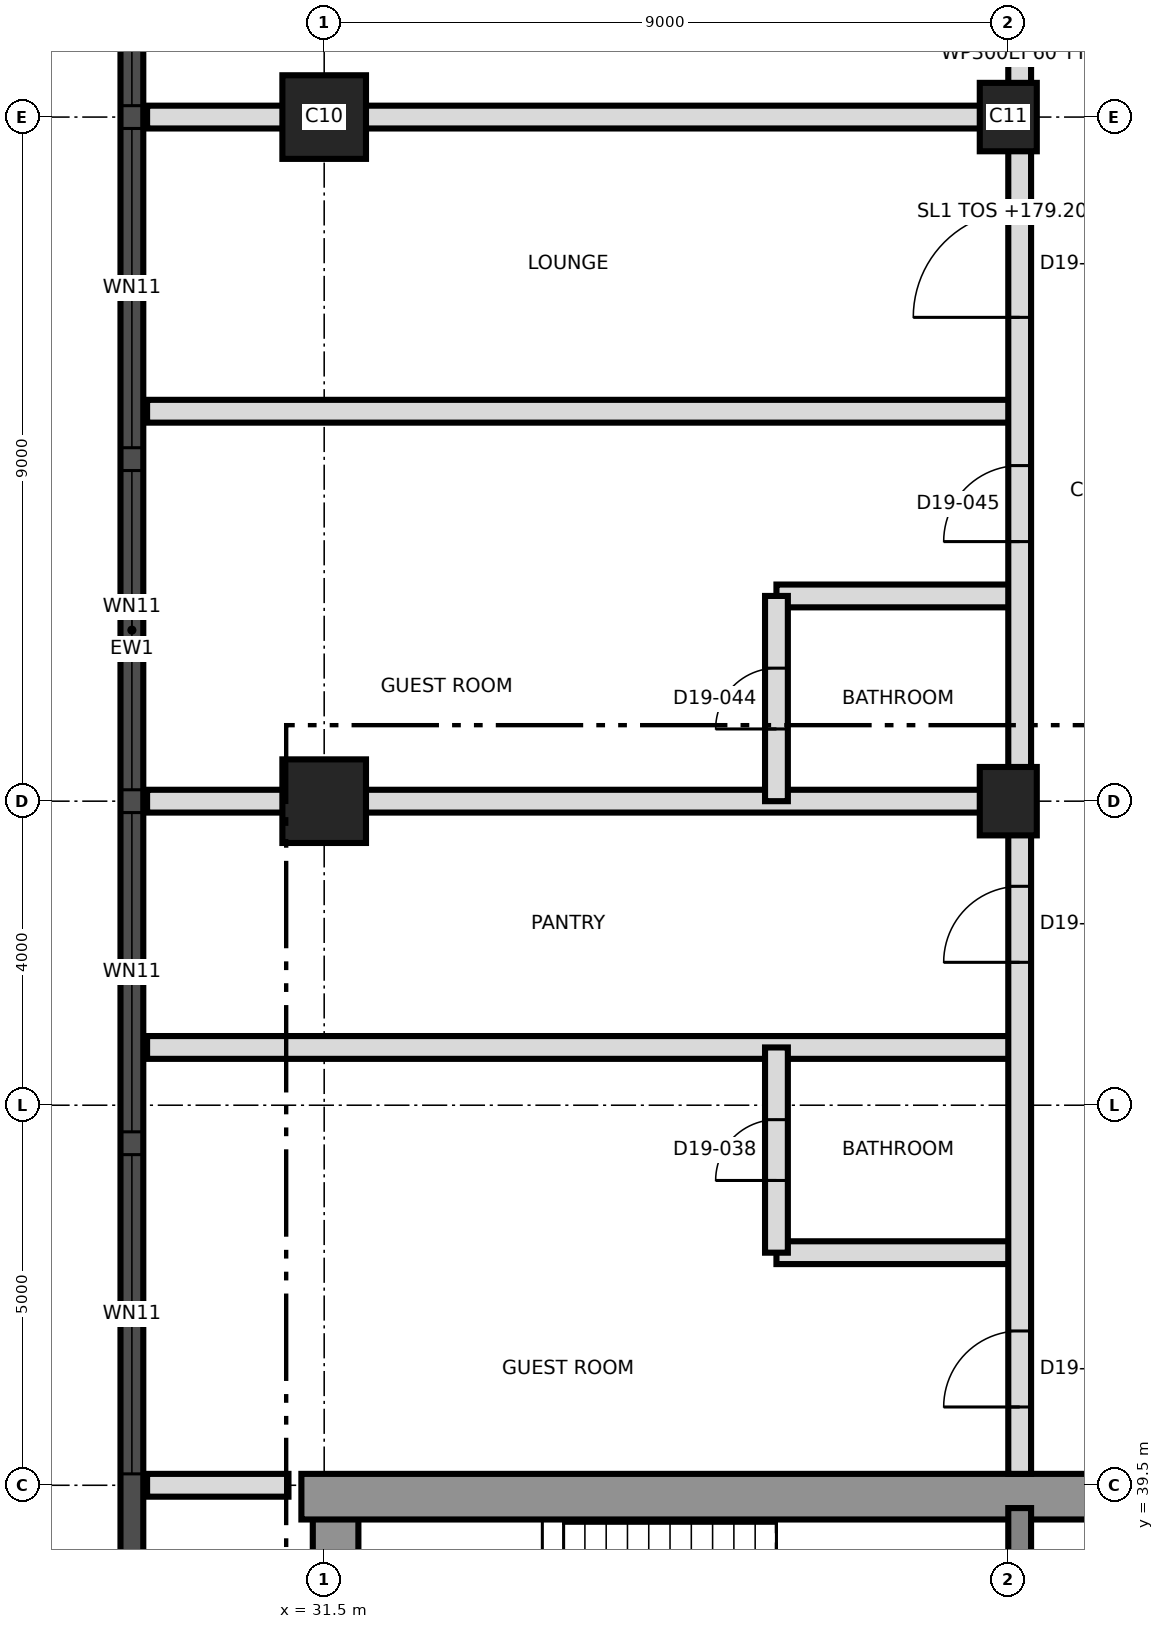
"""IFC4 building model, lengths in metres.
Left out: names, types, materials, properties, quantities, classifications, styles, units other than length and angle.
Written with IfcOpenShell. Run it as: python <this file> out.ifc"""

import sys

from ifc_helpers import new_model, si_unit, direction, frame, frame_2d, origin, origin_2d, place, context, subcontext, project, spatial, rectangle, extrude, element, fill, save


model = new_model("IFC4")
c1 = context("Model", 3, precision=1e-05, world=origin(), true_north=direction((0.0, 1.0)))
c2 = subcontext(c1, "Body", "Model", "MODEL_VIEW")
j1 = project(units=[si_unit("LENGTHUNIT", "METRE"), si_unit("PLANEANGLEUNIT", "RADIAN")], contexts=[c1])
p1 = place(None, origin())
s1 = spatial("IfcSite", under=j1, at=p1, CompositionType="ELEMENT")
p2 = place(p1, origin())
s2 = spatial("IfcBuilding", under=s1, at=p2, CompositionType="ELEMENT")
p3 = place(p2, frame((0.0, 0.0, 179.2)))
s3 = spatial("IfcBuildingStorey", under=s2, at=p3, CompositionType="ELEMENT", Elevation=179.2)
p4 = place(p3, frame((31.65, 21.8, 0.0), z_axis=(0.0, 0.0, 1.0), x_axis=(0.0, 1.0, 0.0)))
e1 = element("IfcWall", 1, at=p4, inside=s3, PredefinedType="SHEAR", context=c2, shape_type="SweptSolid", body=[
    extrude(rectangle(XDim=17.4, YDim=0.6, at=frame_2d((8.7, 0.0))), origin(), (0.0, 0.0, 1.0), 3.7),
])
p5 = place(p3, frame((31.2, 39.35, 0.0), z_axis=(0.0, 0.0, 1.0), x_axis=(1.0, 0.0, 0.0)))
e2 = element("IfcWall", 2, at=p5, inside=s3, PredefinedType="SHEAR", context=c2, shape_type="SweptSolid", body=[
    extrude(rectangle(XDim=27.0, YDim=0.6, at=frame_2d((13.5, 0.0))), origin(), (0.0, 0.0, 1.0), 3.7),
])
p6 = place(p5, frame((10.5, 0.0, 0.0)))
e3 = element("IfcOpeningElement", 3, at=p6, cuts=e2, PredefinedType="OPENING", context=c2, shape_type="SweptSolid", body=[
    extrude(rectangle(XDim=1.2, YDim=2.1, at=frame_2d((0.6, 1.05))), frame((0.0, 0.31, 0.0), z_axis=(0.0, -1.0, 0.0), x_axis=(1.0, 0.0, 0.0)), (0.0, 0.0, 1.0), 0.62),
])
p7 = place(p3, frame((40.65, 33.5, 0.0), z_axis=(0.0, 0.0, 1.0), x_axis=(0.0, 1.0, 0.0)))
e4 = element("IfcWall", 4, at=p7, inside=s3, PredefinedType="SHEAR", context=c2, shape_type="SweptSolid", body=[
    extrude(rectangle(XDim=5.7, YDim=0.3, at=frame_2d((2.85, 0.0))), origin(), (0.0, 0.0, 1.0), 3.7),
])
p8 = place(p3, frame((31.5, 48.5, 0.0), z_axis=(0.0, 0.0, 1.0), x_axis=(1.0, 0.0, 0.0)))
e5 = element("IfcColumn", 5, at=p8, inside=s3, PredefinedType="COLUMN", context=c2, shape_type="SweptSolid", body=[
    extrude(rectangle(XDim=1.1, YDim=1.1, at=origin_2d()), origin(), (0.0, 0.0, 1.0), 3.7),
])
p9 = place(p3, frame((40.5, 48.5, 0.0), z_axis=(0.0, 0.0, 1.0), x_axis=(0.0, 1.0, 0.0)))
e6 = element("IfcColumn", 6, at=p9, inside=s3, PredefinedType="COLUMN", context=c2, shape_type="SweptSolid", body=[
    extrude(rectangle(XDim=0.9, YDim=0.75, at=origin_2d()), origin(), (0.0, 0.0, 1.0), 3.7),
])
p10 = place(p3, frame((31.5, 57.5, 0.0), z_axis=(0.0, 0.0, 1.0), x_axis=(1.0, 0.0, 0.0)))
e7 = element("IfcColumn", 7, at=p10, inside=s3, PredefinedType="COLUMN", context=c2, shape_type="SweptSolid", body=[
    extrude(rectangle(XDim=1.1, YDim=1.1, at=origin_2d()), origin(), (0.0, 0.0, 1.0), 3.7),
])
p11 = place(p3, frame((40.5, 57.5, 0.0), z_axis=(0.0, 0.0, 1.0), x_axis=(0.0, 1.0, 0.0)))
e8 = element("IfcColumn", 8, at=p11, inside=s3, PredefinedType="COLUMN", context=c2, shape_type="SweptSolid", body=[
    extrude(rectangle(XDim=0.9, YDim=0.75, at=origin_2d()), origin(), (0.0, 0.0, 1.0), 3.7),
])
p12 = place(p3, frame((28.97, 66.986, 0.0), z_axis=(0.0, 0.0, 1.0), x_axis=(0.0, -1.0, 0.0)))
e9 = element("IfcWall", 9, at=p12, inside=s3, PredefinedType="SOLIDWALL", context=c2, shape_type="SweptSolid", body=[
    extrude(rectangle(XDim=32.976, YDim=0.3, at=frame_2d((16.488, 0.0))), origin(), (0.0, 0.0, 1.0), 3.4),
])
p13 = place(p12, frame((1.593, 0.0, 0.3)))
e10 = element("IfcOpeningElement", 10, at=p13, cuts=e9, PredefinedType="OPENING", context=c2, shape_type="SweptSolid", body=[
    extrude(rectangle(XDim=1.8, YDim=2.4, at=frame_2d((0.9, 1.2))), frame((0.0, 0.16, 0.0), z_axis=(0.0, -1.0, 0.0), x_axis=(1.0, 0.0, 0.0)), (0.0, 0.0, 1.0), 0.32),
])
p14 = place(p12, frame((5.136, 0.0, 0.9)))
e11 = element("IfcOpeningElement", 11, at=p14, cuts=e9, PredefinedType="OPENING", context=c2, shape_type="SweptSolid", body=[
    extrude(rectangle(XDim=4.2, YDim=1.5, at=frame_2d((2.1, 0.75))), frame((0.0, 0.16, 0.0), z_axis=(0.0, -1.0, 0.0), x_axis=(1.0, 0.0, 0.0)), (0.0, 0.0, 1.0), 0.32),
])
p15 = place(p12, frame((9.636, 0.0, 0.9)))
e12 = element("IfcOpeningElement", 12, at=p15, cuts=e9, PredefinedType="OPENING", context=c2, shape_type="SweptSolid", body=[
    extrude(rectangle(XDim=4.2, YDim=1.5, at=frame_2d((2.1, 0.75))), frame((0.0, 0.16, 0.0), z_axis=(0.0, -1.0, 0.0), x_axis=(1.0, 0.0, 0.0)), (0.0, 0.0, 1.0), 0.32),
])
p16 = place(p12, frame((14.136, 0.0, 0.9)))
e13 = element("IfcOpeningElement", 13, at=p16, cuts=e9, PredefinedType="OPENING", context=c2, shape_type="SweptSolid", body=[
    extrude(rectangle(XDim=4.2, YDim=1.5, at=frame_2d((2.1, 0.75))), frame((0.0, 0.16, 0.0), z_axis=(0.0, -1.0, 0.0), x_axis=(1.0, 0.0, 0.0)), (0.0, 0.0, 1.0), 0.32),
])
p17 = place(p12, frame((18.636, 0.0, 0.9)))
e14 = element("IfcOpeningElement", 14, at=p17, cuts=e9, PredefinedType="OPENING", context=c2, shape_type="SweptSolid", body=[
    extrude(rectangle(XDim=4.2, YDim=1.5, at=frame_2d((2.1, 0.75))), frame((0.0, 0.16, 0.0), z_axis=(0.0, -1.0, 0.0), x_axis=(1.0, 0.0, 0.0)), (0.0, 0.0, 1.0), 0.32),
])
p18 = place(p12, frame((23.136, 0.0, 0.9)))
e15 = element("IfcOpeningElement", 15, at=p18, cuts=e9, PredefinedType="OPENING", context=c2, shape_type="SweptSolid", body=[
    extrude(rectangle(XDim=4.2, YDim=1.5, at=frame_2d((2.1, 0.75))), frame((0.0, 0.16, 0.0), z_axis=(0.0, -1.0, 0.0), x_axis=(1.0, 0.0, 0.0)), (0.0, 0.0, 1.0), 0.32),
])
p19 = place(p12, frame((29.331, 0.0, 0.3)))
e16 = element("IfcOpeningElement", 16, at=p19, cuts=e9, PredefinedType="OPENING", context=c2, shape_type="SweptSolid", body=[
    extrude(rectangle(XDim=1.8, YDim=2.4, at=frame_2d((0.9, 1.2))), frame((0.0, 0.16, 0.0), z_axis=(0.0, -1.0, 0.0), x_axis=(1.0, 0.0, 0.0)), (0.0, 0.0, 1.0), 0.32),
])
p20 = place(p3, frame((29.17, 39.5, 0.0), z_axis=(0.0, 0.0, 1.0), x_axis=(1.0, 0.0, 0.0)))
e17 = element("IfcWall", 17, at=p20, inside=s3, PredefinedType="PARTITIONING", context=c2, shape_type="SweptSolid", body=[
    extrude(rectangle(XDim=1.86, YDim=0.3, at=frame_2d((0.93, 0.0))), origin(), (0.0, 0.0, 1.0), 3.4),
])
p21 = place(p3, frame((37.45, 42.56, 0.0), z_axis=(0.0, 0.0, 1.0), x_axis=(1.0, 0.0, 0.0)))
e18 = element("IfcWall", 18, at=p21, inside=s3, PredefinedType="PARTITIONING", context=c2, shape_type="SweptSolid", body=[
    extrude(rectangle(XDim=3.2, YDim=0.3, at=frame_2d((1.6, 0.0))), origin(), (0.0, 0.0, 1.0), 3.4),
])
for number, where, z_axis, x_axis in (
    (19, (29.17, 45.26, 0.0), (0.0, 0.0, 1.0), (1.0, 0.0, 0.0)),
    (20, (29.17, 48.5, 0.0), (0.0, 0.0, 1.0), (1.0, 0.0, 0.0)),
):
    element("IfcWall", number, at=place(p3, frame(where, z_axis=z_axis, x_axis=x_axis)), inside=s3, PredefinedType="PARTITIONING", context=c2, shape_type="SweptSolid", body=[
        extrude(rectangle(XDim=11.48, YDim=0.3, at=frame_2d((5.74, 0.0))), origin(), (0.0, 0.0, 1.0), 3.4),
    ])
p22 = place(p3, frame((37.45, 51.2, 0.0), z_axis=(0.0, 0.0, 1.0), x_axis=(1.0, 0.0, 0.0)))
e21 = element("IfcWall", 21, at=p22, inside=s3, PredefinedType="PARTITIONING", context=c2, shape_type="SweptSolid", body=[
    extrude(rectangle(XDim=3.2, YDim=0.3, at=frame_2d((1.6, 0.0))), origin(), (0.0, 0.0, 1.0), 3.4),
])
for number, where, z_axis, x_axis in (
    (22, (29.17, 53.63, 0.0), (0.0, 0.0, 1.0), (1.0, 0.0, 0.0)),
    (23, (29.17, 57.5, 0.0), (0.0, 0.0, 1.0), (1.0, 0.0, 0.0)),
):
    element("IfcWall", number, at=place(p3, frame(where, z_axis=z_axis, x_axis=x_axis)), inside=s3, PredefinedType="PARTITIONING", context=c2, shape_type="SweptSolid", body=[
        extrude(rectangle(XDim=11.48, YDim=0.3, at=frame_2d((5.74, 0.0))), origin(), (0.0, 0.0, 1.0), 3.4),
    ])
p23 = place(p3, frame((37.45, 42.56, 0.0), z_axis=(0.0, 0.0, 1.0), x_axis=(0.0, 1.0, 0.0)))
e24 = element("IfcWall", 24, at=p23, inside=s3, PredefinedType="PARTITIONING", context=c2, shape_type="SweptSolid", body=[
    extrude(rectangle(XDim=2.7, YDim=0.3, at=frame_2d((1.35, 0.0))), origin(), (0.0, 0.0, 1.0), 3.4),
])
p24 = place(p23, frame((0.95, 0.0, 0.0)))
e25 = element("IfcOpeningElement", 25, at=p24, cuts=e24, PredefinedType="OPENING", context=c2, shape_type="SweptSolid", body=[
    extrude(rectangle(XDim=0.8, YDim=2.1, at=frame_2d((0.4, 1.05))), frame((0.0, 0.16, 0.0), z_axis=(0.0, -1.0, 0.0), x_axis=(1.0, 0.0, 0.0)), (0.0, 0.0, 1.0), 0.32),
])
p25 = place(p3, frame((37.45, 48.5, 0.0), z_axis=(0.0, 0.0, 1.0), x_axis=(0.0, 1.0, 0.0)))
e26 = element("IfcWall", 26, at=p25, inside=s3, PredefinedType="PARTITIONING", context=c2, shape_type="SweptSolid", body=[
    extrude(rectangle(XDim=2.7, YDim=0.3, at=frame_2d((1.35, 0.0))), origin(), (0.0, 0.0, 1.0), 3.4),
])
p26 = place(p25, frame((0.95, 0.0, 0.0)))
e27 = element("IfcOpeningElement", 27, at=p26, cuts=e26, PredefinedType="OPENING", context=c2, shape_type="SweptSolid", body=[
    extrude(rectangle(XDim=0.8, YDim=2.1, at=frame_2d((0.4, 1.05))), frame((0.0, 0.16, 0.0), z_axis=(0.0, -1.0, 0.0), x_axis=(1.0, 0.0, 0.0)), (0.0, 0.0, 1.0), 0.32),
])
p27 = place(p3, frame((40.65, 39.65, 0.0), z_axis=(0.0, 0.0, 1.0), x_axis=(0.0, 1.0, 0.0)))
e28 = element("IfcWall", 28, at=p27, inside=s3, PredefinedType="PARTITIONING", context=c2, shape_type="SweptSolid", body=[
    extrude(rectangle(XDim=37.35, YDim=0.3, at=frame_2d((18.675, 0.0))), origin(), (0.0, 0.0, 1.0), 3.4),
])
p28 = place(p27, frame((0.88, 0.0, 0.0)))
e29 = element("IfcOpeningElement", 29, at=p28, cuts=e28, PredefinedType="OPENING", context=c2, shape_type="SweptSolid", body=[
    extrude(rectangle(XDim=1.0, YDim=2.1, at=frame_2d((0.5, 1.05))), frame((0.0, 0.16, 0.0), z_axis=(0.0, -1.0, 0.0), x_axis=(1.0, 0.0, 0.0)), (0.0, 0.0, 1.0), 0.32),
])
p29 = place(p27, frame((6.73, 0.0, 0.0)))
e30 = element("IfcOpeningElement", 30, at=p29, cuts=e28, PredefinedType="OPENING", context=c2, shape_type="SweptSolid", body=[
    extrude(rectangle(XDim=1.0, YDim=2.1, at=frame_2d((0.5, 1.05))), frame((0.0, 0.16, 0.0), z_axis=(0.0, -1.0, 0.0), x_axis=(1.0, 0.0, 0.0)), (0.0, 0.0, 1.0), 0.32),
])
p30 = place(p27, frame((12.265, 0.0, 0.0)))
e31 = element("IfcOpeningElement", 31, at=p30, cuts=e28, PredefinedType="OPENING", context=c2, shape_type="SweptSolid", body=[
    extrude(rectangle(XDim=1.0, YDim=2.1, at=frame_2d((0.5, 1.05))), frame((0.0, 0.16, 0.0), z_axis=(0.0, -1.0, 0.0), x_axis=(1.0, 0.0, 0.0)), (0.0, 0.0, 1.0), 0.32),
])
p31 = place(p27, frame((15.215, 0.0, 0.0)))
e32 = element("IfcOpeningElement", 32, at=p31, cuts=e28, PredefinedType="OPENING", context=c2, shape_type="SweptSolid", body=[
    extrude(rectangle(XDim=1.4, YDim=2.1, at=frame_2d((0.7, 1.05))), frame((0.0, 0.16, 0.0), z_axis=(0.0, -1.0, 0.0), x_axis=(1.0, 0.0, 0.0)), (0.0, 0.0, 1.0), 0.32),
])
p32 = place(p27, frame((21.35, 0.0, 0.0)))
e33 = element("IfcOpeningElement", 33, at=p32, cuts=e28, PredefinedType="OPENING", context=c2, shape_type="SweptSolid", body=[
    extrude(rectangle(XDim=1.0, YDim=2.4, at=frame_2d((0.5, 1.2))), frame((0.0, 0.16, 0.0), z_axis=(0.0, -1.0, 0.0), x_axis=(1.0, 0.0, 0.0)), (0.0, 0.0, 1.0), 0.32),
])
p33 = place(p14, origin())
e34 = element("IfcWindow", 34, at=p33, inside=s3, PartitioningType="SINGLE_PANEL", PredefinedType="WINDOW", context=c2, shape_type="SweptSolid", body=[
    extrude(rectangle(XDim=4.2, YDim=1.5, at=frame_2d((2.1, 0.75))), frame((0.0, 0.03, 0.0), z_axis=(0.0, -1.0, 0.0), x_axis=(1.0, 0.0, 0.0)), (0.0, 0.0, 1.0), 0.06),
])
fill(e11, e34)
p34 = place(p15, origin())
e35 = element("IfcWindow", 35, at=p34, inside=s3, PartitioningType="SINGLE_PANEL", PredefinedType="WINDOW", context=c2, shape_type="SweptSolid", body=[
    extrude(rectangle(XDim=4.2, YDim=1.5, at=frame_2d((2.1, 0.75))), frame((0.0, 0.03, 0.0), z_axis=(0.0, -1.0, 0.0), x_axis=(1.0, 0.0, 0.0)), (0.0, 0.0, 1.0), 0.06),
])
fill(e12, e35)
p35 = place(p16, origin())
e36 = element("IfcWindow", 36, at=p35, inside=s3, PartitioningType="SINGLE_PANEL", PredefinedType="WINDOW", context=c2, shape_type="SweptSolid", body=[
    extrude(rectangle(XDim=4.2, YDim=1.5, at=frame_2d((2.1, 0.75))), frame((0.0, 0.03, 0.0), z_axis=(0.0, -1.0, 0.0), x_axis=(1.0, 0.0, 0.0)), (0.0, 0.0, 1.0), 0.06),
])
fill(e13, e36)
p36 = place(p17, origin())
e37 = element("IfcWindow", 37, at=p36, inside=s3, PartitioningType="SINGLE_PANEL", PredefinedType="WINDOW", context=c2, shape_type="SweptSolid", body=[
    extrude(rectangle(XDim=4.2, YDim=1.5, at=frame_2d((2.1, 0.75))), frame((0.0, 0.03, 0.0), z_axis=(0.0, -1.0, 0.0), x_axis=(1.0, 0.0, 0.0)), (0.0, 0.0, 1.0), 0.06),
])
fill(e14, e37)
p37 = place(p18, origin())
e38 = element("IfcWindow", 38, at=p37, inside=s3, PartitioningType="SINGLE_PANEL", PredefinedType="WINDOW", context=c2, shape_type="SweptSolid", body=[
    extrude(rectangle(XDim=4.2, YDim=1.5, at=frame_2d((2.1, 0.75))), frame((0.0, 0.03, 0.0), z_axis=(0.0, -1.0, 0.0), x_axis=(1.0, 0.0, 0.0)), (0.0, 0.0, 1.0), 0.06),
])
fill(e15, e38)
p38 = place(p24, origin())
e39 = element("IfcDoor", 39, at=p38, inside=s3, OperationType="SINGLE_SWING_LEFT", PredefinedType="DOOR", context=c2, shape_type="SweptSolid", body=[
    extrude(rectangle(XDim=0.8, YDim=2.1, at=frame_2d((0.4, 1.05))), frame((0.0, 0.025, 0.0), z_axis=(0.0, -1.0, 0.0), x_axis=(1.0, 0.0, 0.0)), (0.0, 0.0, 1.0), 0.05),
])
fill(e25, e39)
p39 = place(p28, origin())
e40 = element("IfcDoor", 40, at=p39, inside=s3, OperationType="SINGLE_SWING_RIGHT", PredefinedType="DOOR", context=c2, shape_type="SweptSolid", body=[
    extrude(rectangle(XDim=1.0, YDim=2.1, at=frame_2d((0.5, 1.05))), frame((0.0, 0.025, 0.0), z_axis=(0.0, -1.0, 0.0), x_axis=(1.0, 0.0, 0.0)), (0.0, 0.0, 1.0), 0.05),
])
fill(e29, e40)
p40 = place(p29, origin())
e41 = element("IfcDoor", 41, at=p40, inside=s3, OperationType="SINGLE_SWING_LEFT", PredefinedType="DOOR", context=c2, shape_type="SweptSolid", body=[
    extrude(rectangle(XDim=1.0, YDim=2.1, at=frame_2d((0.5, 1.05))), frame((0.0, 0.025, 0.0), z_axis=(0.0, -1.0, 0.0), x_axis=(1.0, 0.0, 0.0)), (0.0, 0.0, 1.0), 0.05),
])
fill(e30, e41)
p41 = place(p26, origin())
e42 = element("IfcDoor", 42, at=p41, inside=s3, OperationType="SINGLE_SWING_LEFT", PredefinedType="DOOR", context=c2, shape_type="SweptSolid", body=[
    extrude(rectangle(XDim=0.8, YDim=2.1, at=frame_2d((0.4, 1.05))), frame((0.0, 0.025, 0.0), z_axis=(0.0, -1.0, 0.0), x_axis=(1.0, 0.0, 0.0)), (0.0, 0.0, 1.0), 0.05),
])
fill(e27, e42)
p42 = place(p30, origin())
e43 = element("IfcDoor", 43, at=p42, inside=s3, OperationType="SINGLE_SWING_RIGHT", PredefinedType="DOOR", context=c2, shape_type="SweptSolid", body=[
    extrude(rectangle(XDim=1.0, YDim=2.1, at=frame_2d((0.5, 1.05))), frame((0.0, 0.025, 0.0), z_axis=(0.0, -1.0, 0.0), x_axis=(1.0, 0.0, 0.0)), (0.0, 0.0, 1.0), 0.05),
])
fill(e31, e43)
p43 = place(p31, origin())
e44 = element("IfcDoor", 44, at=p43, inside=s3, OperationType="SINGLE_SWING_LEFT", PredefinedType="DOOR", context=c2, shape_type="SweptSolid", body=[
    extrude(rectangle(XDim=1.4, YDim=2.1, at=frame_2d((0.7, 1.05))), frame((0.0, 0.025, 0.0), z_axis=(0.0, -1.0, 0.0), x_axis=(1.0, 0.0, 0.0)), (0.0, 0.0, 1.0), 0.05),
])
fill(e32, e44)
save(model, sys.argv[1])
